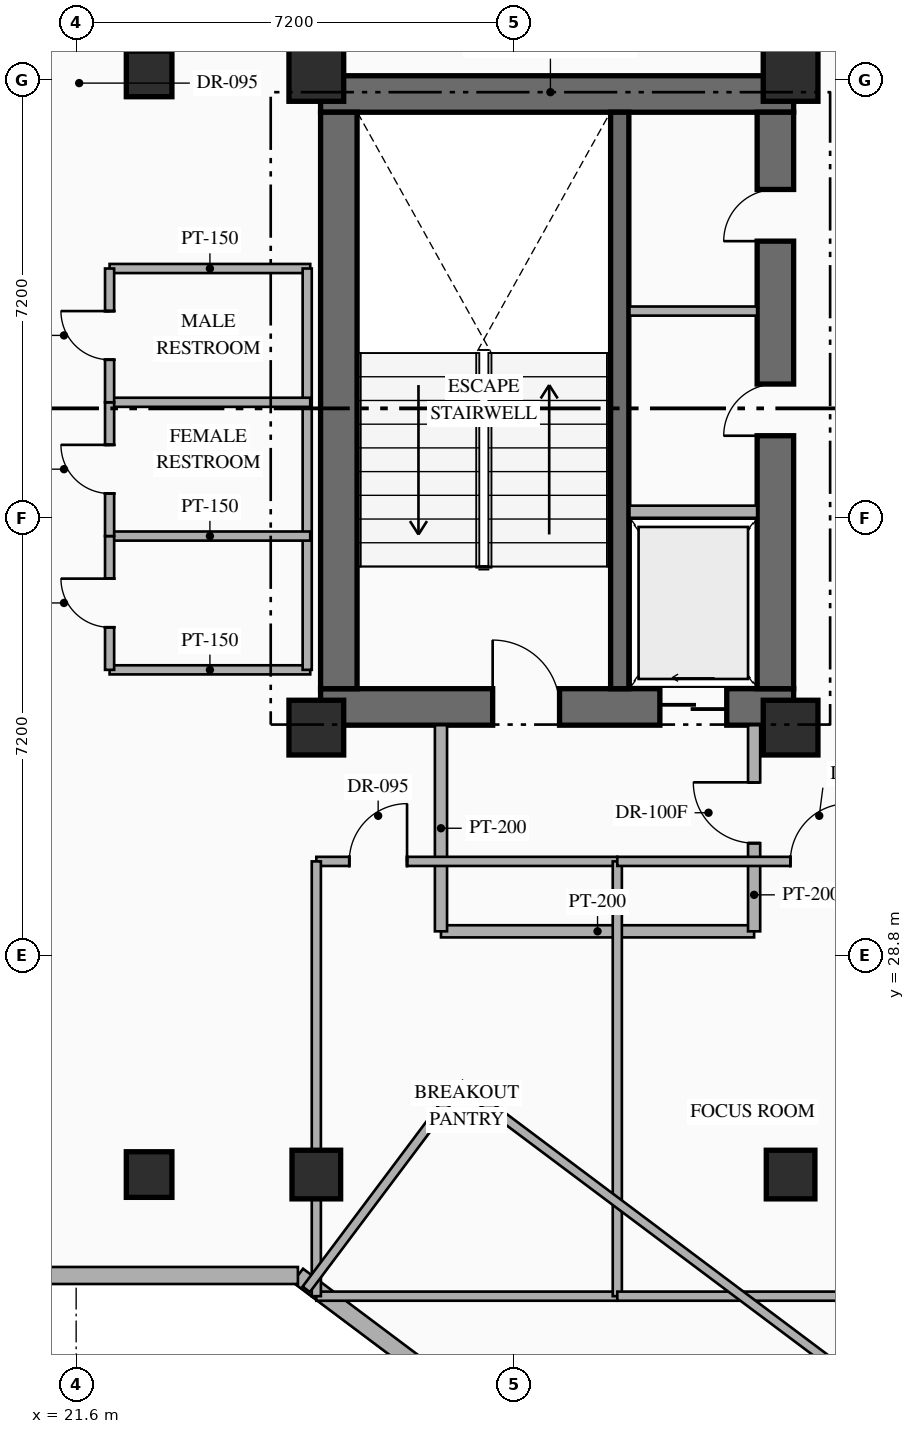
"""IFC4 building model, lengths in metres.
Left out: names, types, materials, properties, quantities, classifications, styles, units other than length and angle.
Written with IfcOpenShell. Run it as: python <this file> out.ifc"""

import sys

from ifc_helpers import new_model, si_unit, direction, frame, frame_2d, origin, origin_2d, place, context, subcontext, project, spatial, rectangle, hollow_rectangle, extrude, element, fill, save


model = new_model("IFC4")
c1 = context("Model", 3, precision=1e-05, world=origin(), true_north=direction((0.0, 1.0)))
c2 = subcontext(c1, "Body", "Model", "MODEL_VIEW")
j1 = project(units=[si_unit("LENGTHUNIT", "METRE"), si_unit("PLANEANGLEUNIT", "RADIAN")], contexts=[c1])
p1 = place(None, origin())
s1 = spatial("IfcSite", under=j1, at=p1, CompositionType="ELEMENT")
p2 = place(p1, origin())
s2 = spatial("IfcBuilding", under=s1, at=p2, CompositionType="ELEMENT")
p3 = place(p2, frame((0.0, 0.0, 167.25)))
s3 = spatial("IfcBuildingStorey", under=s2, at=p3, CompositionType="ELEMENT", Elevation=167.25)
p4 = place(p3, frame((25.62, 32.89, 0.0), z_axis=(0.0, 0.0, 1.0), x_axis=(1.0, 0.0, 0.0)))
e1 = element("IfcWall", 1, at=p4, inside=s3, PredefinedType="SHEAR", context=c2, shape_type="SweptSolid", body=[
    extrude(rectangle(XDim=7.78, YDim=0.6, at=frame_2d((3.89, 0.0))), origin(), (0.0, 0.0, 1.0), 3.6),
])
p5 = place(p4, frame((2.83, 0.0, 0.0)))
e2 = element("IfcOpeningElement", 2, at=p5, cuts=e1, PredefinedType="OPENING", context=c2, shape_type="SweptSolid", body=[
    extrude(rectangle(XDim=1.1, YDim=2.2, at=frame_2d((0.55, 1.1))), frame((0.0, 0.31, 0.0), z_axis=(0.0, -1.0, 0.0), x_axis=(1.0, 0.0, 0.0)), (0.0, 0.0, 1.0), 0.62),
])
p6 = place(p4, frame((5.58, 0.0, 0.0)))
e3 = element("IfcOpeningElement", 3, at=p6, cuts=e1, PredefinedType="OPENING", context=c2, shape_type="SweptSolid", body=[
    extrude(rectangle(XDim=1.1, YDim=2.15, at=frame_2d((0.55, 1.075))), frame((0.0, 0.31, 0.0), z_axis=(0.0, -1.0, 0.0), x_axis=(1.0, 0.0, 0.0)), (0.0, 0.0, 1.0), 0.62),
])
p7 = place(p3, frame((25.62, 42.97, 0.0), z_axis=(0.0, 0.0, 1.0), x_axis=(1.0, 0.0, 0.0)))
e4 = element("IfcWall", 4, at=p7, inside=s3, PredefinedType="SHEAR", context=c2, shape_type="SweptSolid", body=[
    extrude(rectangle(XDim=7.78, YDim=0.6, at=frame_2d((3.89, 0.0))), origin(), (0.0, 0.0, 1.0), 3.6),
])
p8 = place(p3, frame((25.92, 33.19, 0.0), z_axis=(0.0, 0.0, 1.0), x_axis=(0.0, 1.0, 0.0)))
e5 = element("IfcWall", 5, at=p8, inside=s3, PredefinedType="SHEAR", context=c2, shape_type="SweptSolid", body=[
    extrude(rectangle(XDim=9.48, YDim=0.6, at=frame_2d((4.74, 0.0))), origin(), (0.0, 0.0, 1.0), 3.6),
])
p9 = place(p3, frame((33.1, 33.19, 0.0), z_axis=(0.0, 0.0, 1.0), x_axis=(0.0, 1.0, 0.0)))
e6 = element("IfcWall", 6, at=p9, inside=s3, PredefinedType="SHEAR", context=c2, shape_type="SweptSolid", body=[
    extrude(rectangle(XDim=9.48, YDim=0.6, at=frame_2d((4.74, 0.0))), origin(), (0.0, 0.0, 1.0), 3.6),
])
p10 = place(p9, frame((4.16, 0.0, 0.0)))
e7 = element("IfcOpeningElement", 7, at=p10, cuts=e6, PredefinedType="OPENING", context=c2, shape_type="SweptSolid", body=[
    extrude(rectangle(XDim=0.85, YDim=2.08, at=frame_2d((0.425, 1.04))), frame((0.0, 0.31, 0.0), z_axis=(0.0, -1.0, 0.0), x_axis=(1.0, 0.0, 0.0)), (0.0, 0.0, 1.0), 0.62),
])
p11 = place(p9, frame((7.36, 0.0, 0.0)))
e8 = element("IfcOpeningElement", 8, at=p11, cuts=e6, PredefinedType="OPENING", context=c2, shape_type="SweptSolid", body=[
    extrude(rectangle(XDim=0.85, YDim=2.08, at=frame_2d((0.425, 1.04))), frame((0.0, 0.31, 0.0), z_axis=(0.0, -1.0, 0.0), x_axis=(1.0, 0.0, 0.0)), (0.0, 0.0, 1.0), 0.62),
])
p12 = place(p3, frame((30.54, 33.19, 0.0), z_axis=(0.0, 0.0, 1.0), x_axis=(0.0, 1.0, 0.0)))
e9 = element("IfcWall", 9, at=p12, inside=s3, PredefinedType="SHEAR", context=c2, shape_type="SweptSolid", body=[
    extrude(rectangle(XDim=9.48, YDim=0.3, at=frame_2d((4.74, 0.0))), origin(), (0.0, 0.0, 1.0), 3.6),
])
for number, where, z_axis, x_axis in (
    (10, (25.55, 32.55, 0.0), (0.0, 0.0, 1.0), (1.0, 0.0, 0.0)),
    (11, (33.35, 32.55, 0.0), (0.0, 0.0, 1.0), (1.0, 0.0, 0.0)),
    (12, (25.55, 43.3, 0.0), (0.0, 0.0, 1.0), (1.0, 0.0, 0.0)),
    (13, (33.35, 43.3, 0.0), (0.0, 0.0, 1.0), (1.0, 0.0, 0.0)),
):
    element("IfcColumn", number, at=place(p3, frame(where, z_axis=z_axis, x_axis=x_axis)), inside=s3, PredefinedType="COLUMN", context=c2, shape_type="SweptSolid", body=[
        extrude(rectangle(XDim=0.9, YDim=0.9, at=origin_2d()), origin(), (0.0, 0.0, 1.0), 3.6),
    ])
for number, where, z_axis, x_axis in (
    (14, (25.55, 25.2, 0.0), (0.0, 0.0, 1.0), (1.0, 0.0, 0.0)),
    (15, (33.35, 25.2, 0.0), (0.0, 0.0, 1.0), (1.0, 0.0, 0.0)),
):
    element("IfcColumn", number, at=place(p3, frame(where, z_axis=z_axis, x_axis=x_axis)), inside=s3, PredefinedType="COLUMN", context=c2, shape_type="SweptSolid", body=[
        extrude(hollow_rectangle(XDim=0.8, YDim=0.8, WallThickness=0.032, at=origin_2d()), origin(), (0.0, 0.0, 1.0), 3.6),
    ])
for number, where, z_axis, x_axis in (
    (16, (22.8, 25.2, 0.0), (0.0, 0.0, 1.0), (1.0, 0.0, 0.0)),
    (17, (22.8, 43.3, 0.0), (0.0, 0.0, 1.0), (1.0, 0.0, 0.0)),
):
    element("IfcColumn", number, at=place(p3, frame(where, z_axis=z_axis, x_axis=x_axis)), inside=s3, PredefinedType="COLUMN", context=c2, shape_type="SweptSolid", body=[
        extrude(hollow_rectangle(XDim=0.75, YDim=0.75, WallThickness=0.028, at=origin_2d()), origin(), (0.0, 0.0, 1.0), 3.6),
    ])
p13 = place(p3, frame((44.918, 8.787, 0.0), z_axis=(0.0, 0.0, 1.0), x_axis=(-0.800004765927, 0.599993645378, 0.0)))
e18 = element("IfcWall", 18, at=p13, inside=s3, PredefinedType="STANDARD", context=c2, shape_type="SweptSolid", body=[
    extrude(rectangle(XDim=24.588, YDim=0.28, at=frame_2d((12.294, 0.0))), origin(), (0.0, 0.0, 1.0), 3.35),
])
p14 = place(p3, frame((25.247, 23.54, 0.0), z_axis=(0.0, 0.0, 1.0), x_axis=(-1.0, 0.0, 0.0)))
e19 = element("IfcWall", 19, at=p14, inside=s3, PredefinedType="STANDARD", context=c2, shape_type="SweptSolid", body=[
    extrude(rectangle(XDim=6.747, YDim=0.28, at=frame_2d((3.374, 0.0))), origin(), (0.0, 0.0, 1.0), 3.35),
])
p15 = place(p3, frame((30.7, 36.1, 0.0), z_axis=(0.0, 0.0, 1.0), x_axis=(1.0, 0.0, 0.0)))
e20 = element("IfcWall", 20, at=p15, inside=s3, PredefinedType="STANDARD", context=c2, shape_type="SweptSolid", body=[
    extrude(rectangle(XDim=2.1, YDim=0.2, at=frame_2d((1.05, 0.0))), origin(), (0.0, 0.0, 1.0), 3.35),
])
p16 = place(p3, frame((30.7, 39.4, 0.0), z_axis=(0.0, 0.0, 1.0), x_axis=(1.0, 0.0, 0.0)))
e21 = element("IfcWall", 21, at=p16, inside=s3, PredefinedType="PARTITIONING", context=c2, shape_type="SweptSolid", body=[
    extrude(rectangle(XDim=2.1, YDim=0.15, at=frame_2d((1.05, 0.0))), origin(), (0.0, 0.0, 1.0), 3.35),
])
p17 = place(p3, frame((27.6, 29.2, 0.0), z_axis=(0.0, 0.0, 1.0), x_axis=(1.0, 0.0, 0.0)))
e22 = element("IfcWall", 22, at=p17, inside=s3, PredefinedType="STANDARD", context=c2, shape_type="SweptSolid", body=[
    extrude(rectangle(XDim=5.15, YDim=0.2, at=frame_2d((2.575, 0.0))), origin(), (0.0, 0.0, 1.0), 3.35),
])
p18 = place(p3, frame((27.6, 29.2, 0.0), z_axis=(0.0, 0.0, 1.0), x_axis=(0.0, 1.0, 0.0)))
e23 = element("IfcWall", 23, at=p18, inside=s3, PredefinedType="STANDARD", context=c2, shape_type="SweptSolid", body=[
    extrude(rectangle(XDim=3.39, YDim=0.2, at=frame_2d((1.695, 0.0))), origin(), (0.0, 0.0, 1.0), 3.35),
])
p19 = place(p3, frame((32.75, 29.2, 0.0), z_axis=(0.0, 0.0, 1.0), x_axis=(0.0, 1.0, 0.0)))
e24 = element("IfcWall", 24, at=p19, inside=s3, PredefinedType="STANDARD", context=c2, shape_type="SweptSolid", body=[
    extrude(rectangle(XDim=3.39, YDim=0.2, at=frame_2d((1.695, 0.0))), origin(), (0.0, 0.0, 1.0), 3.35),
])
p20 = place(p19, frame((1.45, 0.0, 0.0)))
e25 = element("IfcOpeningElement", 25, at=p20, cuts=e24, PredefinedType="OPENING", context=c2, shape_type="SweptSolid", body=[
    extrude(rectangle(XDim=1.0, YDim=2.2, at=frame_2d((0.5, 1.1))), frame((0.0, 0.11, 0.0), z_axis=(0.0, -1.0, 0.0), x_axis=(1.0, 0.0, 0.0)), (0.0, 0.0, 1.0), 0.22),
])
for number, where, z_axis, x_axis in (
    (26, (22.15, 33.5, 0.0), (0.0, 0.0, 1.0), (1.0, 0.0, 0.0)),
    (27, (22.15, 40.1, 0.0), (0.0, 0.0, 1.0), (1.0, 0.0, 0.0)),
):
    element("IfcWall", number, at=place(p3, frame(where, z_axis=z_axis, x_axis=x_axis)), inside=s3, PredefinedType="PARTITIONING", context=c2, shape_type="SweptSolid", body=[
        extrude(rectangle(XDim=3.3, YDim=0.15, at=frame_2d((1.65, 0.0))), origin(), (0.0, 0.0, 1.0), 3.35),
    ])
p21 = place(p3, frame((25.4, 33.5, 0.0), z_axis=(0.0, 0.0, 1.0), x_axis=(0.0, 1.0, 0.0)))
e28 = element("IfcWall", 28, at=p21, inside=s3, PredefinedType="PARTITIONING", context=c2, shape_type="SweptSolid", body=[
    extrude(rectangle(XDim=6.6, YDim=0.15, at=frame_2d((3.3, 0.0))), origin(), (0.0, 0.0, 1.0), 3.35),
])
for number, where, z_axis, x_axis in (
    (29, (22.15, 35.7, 0.0), (0.0, 0.0, 1.0), (1.0, 0.0, 0.0)),
    (30, (22.15, 37.9, 0.0), (0.0, 0.0, 1.0), (1.0, 0.0, 0.0)),
):
    element("IfcWall", number, at=place(p3, frame(where, z_axis=z_axis, x_axis=x_axis)), inside=s3, PredefinedType="PARTITIONING", context=c2, shape_type="SweptSolid", body=[
        extrude(rectangle(XDim=3.3, YDim=0.15, at=frame_2d((1.65, 0.0))), origin(), (0.0, 0.0, 1.0), 3.35),
    ])
p22 = place(p3, frame((22.15, 33.5, 0.0), z_axis=(0.0, 0.0, 1.0), x_axis=(0.0, 1.0, 0.0)))
e31 = element("IfcWall", 31, at=p22, inside=s3, PredefinedType="PARTITIONING", context=c2, shape_type="SweptSolid", body=[
    extrude(rectangle(XDim=2.2, YDim=0.15, at=frame_2d((1.1, 0.0))), origin(), (0.0, 0.0, 1.0), 3.35),
])
p23 = place(p22, frame((0.7, 0.0, 0.0)))
e32 = element("IfcOpeningElement", 32, at=p23, cuts=e31, PredefinedType="OPENING", context=c2, shape_type="SweptSolid", body=[
    extrude(rectangle(XDim=0.8, YDim=2.06, at=frame_2d((0.4, 1.03))), frame((0.0, 0.085, 0.0), z_axis=(0.0, -1.0, 0.0), x_axis=(1.0, 0.0, 0.0)), (0.0, 0.0, 1.0), 0.17),
])
p24 = place(p3, frame((22.15, 35.7, 0.0), z_axis=(0.0, 0.0, 1.0), x_axis=(0.0, 1.0, 0.0)))
e33 = element("IfcWall", 33, at=p24, inside=s3, PredefinedType="PARTITIONING", context=c2, shape_type="SweptSolid", body=[
    extrude(rectangle(XDim=2.2, YDim=0.15, at=frame_2d((1.1, 0.0))), origin(), (0.0, 0.0, 1.0), 3.35),
])
p25 = place(p24, frame((0.7, 0.0, 0.0)))
e34 = element("IfcOpeningElement", 34, at=p25, cuts=e33, PredefinedType="OPENING", context=c2, shape_type="SweptSolid", body=[
    extrude(rectangle(XDim=0.8, YDim=2.06, at=frame_2d((0.4, 1.03))), frame((0.0, 0.085, 0.0), z_axis=(0.0, -1.0, 0.0), x_axis=(1.0, 0.0, 0.0)), (0.0, 0.0, 1.0), 0.17),
])
p26 = place(p3, frame((22.15, 37.9, 0.0), z_axis=(0.0, 0.0, 1.0), x_axis=(0.0, 1.0, 0.0)))
e35 = element("IfcWall", 35, at=p26, inside=s3, PredefinedType="PARTITIONING", context=c2, shape_type="SweptSolid", body=[
    extrude(rectangle(XDim=2.2, YDim=0.15, at=frame_2d((1.1, 0.0))), origin(), (0.0, 0.0, 1.0), 3.35),
])
p27 = place(p26, frame((0.7, 0.0, 0.0)))
e36 = element("IfcOpeningElement", 36, at=p27, cuts=e35, PredefinedType="OPENING", context=c2, shape_type="SweptSolid", body=[
    extrude(rectangle(XDim=0.8, YDim=2.06, at=frame_2d((0.4, 1.03))), frame((0.0, 0.085, 0.0), z_axis=(0.0, -1.0, 0.0), x_axis=(1.0, 0.0, 0.0)), (0.0, 0.0, 1.0), 0.17),
])
p28 = place(p3, frame((25.55, 23.2, 0.0), z_axis=(0.0, 0.0, 1.0), x_axis=(1.0, 0.0, 0.0)))
e37 = element("IfcWall", 37, at=p28, inside=s3, PredefinedType="PARTITIONING", context=c2, shape_type="SweptSolid", body=[
    extrude(rectangle(XDim=4.95, YDim=0.15, at=frame_2d((2.475, 0.0))), origin(), (0.0, 0.0, 1.0), 3.35),
])
p29 = place(p3, frame((25.55, 30.35, 0.0), z_axis=(0.0, 0.0, 1.0), x_axis=(1.0, 0.0, 0.0)))
e38 = element("IfcWall", 38, at=p29, inside=s3, PredefinedType="PARTITIONING", context=c2, shape_type="SweptSolid", body=[
    extrude(rectangle(XDim=4.95, YDim=0.15, at=frame_2d((2.475, 0.0))), origin(), (0.0, 0.0, 1.0), 3.35),
])
p30 = place(p29, frame((0.542, 0.0, 0.0)))
e39 = element("IfcOpeningElement", 39, at=p30, cuts=e38, PredefinedType="OPENING", context=c2, shape_type="SweptSolid", body=[
    extrude(rectangle(XDim=0.95, YDim=2.15, at=frame_2d((0.475, 1.075))), frame((0.0, 0.085, 0.0), z_axis=(0.0, -1.0, 0.0), x_axis=(1.0, 0.0, 0.0)), (0.0, 0.0, 1.0), 0.17),
])
p31 = place(p3, frame((25.55, 23.2, 0.0), z_axis=(0.0, 0.0, 1.0), x_axis=(0.0, 1.0, 0.0)))
e40 = element("IfcWall", 40, at=p31, inside=s3, PredefinedType="PARTITIONING", context=c2, shape_type="SweptSolid", body=[
    extrude(rectangle(XDim=7.15, YDim=0.15, at=frame_2d((3.575, 0.0))), origin(), (0.0, 0.0, 1.0), 2.695),
])
p32 = place(p3, frame((30.5, 23.2, 0.0), z_axis=(0.0, 0.0, 1.0), x_axis=(0.0, 1.0, 0.0)))
e41 = element("IfcWall", 41, at=p32, inside=s3, PredefinedType="PARTITIONING", context=c2, shape_type="SweptSolid", body=[
    extrude(rectangle(XDim=7.15, YDim=0.15, at=frame_2d((3.575, 0.0))), origin(), (0.0, 0.0, 1.0), 3.35),
])
p33 = place(p3, frame((30.5, 23.2, 0.0), z_axis=(0.0, 0.0, 1.0), x_axis=(1.0, 0.0, 0.0)))
e42 = element("IfcWall", 42, at=p33, inside=s3, PredefinedType="PARTITIONING", context=c2, shape_type="SweptSolid", body=[
    extrude(rectangle(XDim=4.45, YDim=0.15, at=frame_2d((2.225, 0.0))), origin(), (0.0, 0.0, 1.0), 3.35),
])
p34 = place(p3, frame((30.5, 30.35, 0.0), z_axis=(0.0, 0.0, 1.0), x_axis=(1.0, 0.0, 0.0)))
e43 = element("IfcWall", 43, at=p34, inside=s3, PredefinedType="PARTITIONING", context=c2, shape_type="SweptSolid", body=[
    extrude(rectangle(XDim=4.45, YDim=0.15, at=frame_2d((2.225, 0.0))), origin(), (0.0, 0.0, 1.0), 3.35),
])
p35 = place(p34, frame((2.846, 0.0, 0.0)))
e44 = element("IfcOpeningElement", 44, at=p35, cuts=e43, PredefinedType="OPENING", context=c2, shape_type="SweptSolid", body=[
    extrude(rectangle(XDim=0.95, YDim=2.15, at=frame_2d((0.475, 1.075))), frame((0.0, 0.085, 0.0), z_axis=(0.0, -1.0, 0.0), x_axis=(1.0, 0.0, 0.0)), (0.0, 0.0, 1.0), 0.17),
])
p36 = place(p3, frame((27.91, 26.68, 0.0), z_axis=(0.0, 0.0, 1.0), x_axis=(0.800005938517, -0.599992081896, 0.0)))
e45 = element("IfcWall", 45, at=p36, inside=s3, PredefinedType="PARTITIONING", context=c2, shape_type="SweptSolid", body=[
    extrude(rectangle(XDim=14.8, YDim=0.15, at=frame_2d((7.4, 0.0))), origin(), (0.0, 0.0, 1.0), 3.35),
])
p37 = place(p36, frame((9.281, 0.0, 0.0)))
e46 = element("IfcOpeningElement", 46, at=p37, cuts=e45, PredefinedType="OPENING", context=c2, shape_type="SweptSolid", body=[
    extrude(rectangle(XDim=0.95, YDim=2.15, at=frame_2d((0.475, 1.075))), frame((0.0, 0.085, 0.0), z_axis=(0.0, -1.0, 0.0), x_axis=(1.0, 0.0, 0.0)), (0.0, 0.0, 1.0), 0.17),
])
p38 = place(p3, frame((25.384, 23.312, 0.0), z_axis=(0.0, 0.0, 1.0), x_axis=(0.599990721155, 0.80000695905, 0.0)))
e47 = element("IfcWall", 47, at=p38, inside=s3, PredefinedType="PARTITIONING", context=c2, shape_type="SweptSolid", body=[
    extrude(rectangle(XDim=4.21, YDim=0.15, at=frame_2d((2.105, 0.0))), origin(), (0.0, 0.0, 1.0), 3.35),
])
p39 = place(p5, origin())
e48 = element("IfcDoor", 48, at=p39, inside=s3, OperationType="SINGLE_SWING_LEFT", PredefinedType="DOOR", context=c2, shape_type="SweptSolid", body=[
    extrude(rectangle(XDim=1.1, YDim=2.2, at=frame_2d((0.55, 1.1))), frame((0.0, 0.025, 0.0), z_axis=(0.0, -1.0, 0.0), x_axis=(1.0, 0.0, 0.0)), (0.0, 0.0, 1.0), 0.05),
])
fill(e2, e48)
p40 = place(p6, origin())
e49 = element("IfcDoor", 49, at=p40, inside=s3, OperationType="SLIDING_TO_LEFT", PredefinedType="USERDEFINED", context=c2, shape_type="SweptSolid", body=[
    extrude(rectangle(XDim=1.1, YDim=2.15, at=frame_2d((0.55, 1.075))), frame((0.0, 0.025, 0.0), z_axis=(0.0, -1.0, 0.0), x_axis=(1.0, 0.0, 0.0)), (0.0, 0.0, 1.0), 0.05),
])
fill(e3, e49)
p41 = place(p10, origin())
e50 = element("IfcDoor", 50, at=p41, inside=s3, OperationType="SINGLE_SWING_LEFT", PredefinedType="DOOR", context=c2, shape_type="SweptSolid", body=[
    extrude(rectangle(XDim=0.85, YDim=2.08, at=frame_2d((0.425, 1.04))), frame((0.0, 0.025, 0.0), z_axis=(0.0, -1.0, 0.0), x_axis=(1.0, 0.0, 0.0)), (0.0, 0.0, 1.0), 0.05),
])
fill(e7, e50)
p42 = place(p11, origin())
e51 = element("IfcDoor", 51, at=p42, inside=s3, OperationType="SINGLE_SWING_LEFT", PredefinedType="DOOR", context=c2, shape_type="SweptSolid", body=[
    extrude(rectangle(XDim=0.85, YDim=2.08, at=frame_2d((0.425, 1.04))), frame((0.0, 0.025, 0.0), z_axis=(0.0, -1.0, 0.0), x_axis=(1.0, 0.0, 0.0)), (0.0, 0.0, 1.0), 0.05),
])
fill(e8, e51)
p43 = place(p20, origin())
e52 = element("IfcDoor", 52, at=p43, inside=s3, OperationType="SINGLE_SWING_RIGHT", PredefinedType="DOOR", context=c2, shape_type="SweptSolid", body=[
    extrude(rectangle(XDim=1.0, YDim=2.2, at=frame_2d((0.5, 1.1))), frame((0.0, 0.025, 0.0), z_axis=(0.0, -1.0, 0.0), x_axis=(1.0, 0.0, 0.0)), (0.0, 0.0, 1.0), 0.05),
])
fill(e25, e52)
p44 = place(p23, origin())
e53 = element("IfcDoor", 53, at=p44, inside=s3, OperationType="SINGLE_SWING_RIGHT", PredefinedType="DOOR", context=c2, shape_type="SweptSolid", body=[
    extrude(rectangle(XDim=0.8, YDim=2.06, at=frame_2d((0.4, 1.03))), frame((0.0, 0.025, 0.0), z_axis=(0.0, -1.0, 0.0), x_axis=(1.0, 0.0, 0.0)), (0.0, 0.0, 1.0), 0.05),
])
fill(e32, e53)
p45 = place(p25, origin())
e54 = element("IfcDoor", 54, at=p45, inside=s3, OperationType="SINGLE_SWING_RIGHT", PredefinedType="DOOR", context=c2, shape_type="SweptSolid", body=[
    extrude(rectangle(XDim=0.8, YDim=2.06, at=frame_2d((0.4, 1.03))), frame((0.0, 0.025, 0.0), z_axis=(0.0, -1.0, 0.0), x_axis=(1.0, 0.0, 0.0)), (0.0, 0.0, 1.0), 0.05),
])
fill(e34, e54)
p46 = place(p27, origin())
e55 = element("IfcDoor", 55, at=p46, inside=s3, OperationType="SINGLE_SWING_RIGHT", PredefinedType="DOOR", context=c2, shape_type="SweptSolid", body=[
    extrude(rectangle(XDim=0.8, YDim=2.06, at=frame_2d((0.4, 1.03))), frame((0.0, 0.025, 0.0), z_axis=(0.0, -1.0, 0.0), x_axis=(1.0, 0.0, 0.0)), (0.0, 0.0, 1.0), 0.05),
])
fill(e36, e55)
p47 = place(p30, origin())
e56 = element("IfcDoor", 56, at=p47, inside=s3, OperationType="SINGLE_SWING_RIGHT", PredefinedType="DOOR", context=c2, shape_type="SweptSolid", body=[
    extrude(rectangle(XDim=0.95, YDim=2.15, at=frame_2d((0.475, 1.075))), frame((0.0, 0.025, 0.0), z_axis=(0.0, -1.0, 0.0), x_axis=(1.0, 0.0, 0.0)), (0.0, 0.0, 1.0), 0.05),
])
fill(e39, e56)
p48 = place(p35, origin())
e57 = element("IfcDoor", 57, at=p48, inside=s3, OperationType="SINGLE_SWING_RIGHT", PredefinedType="DOOR", context=c2, shape_type="SweptSolid", body=[
    extrude(rectangle(XDim=0.95, YDim=2.15, at=frame_2d((0.475, 1.075))), frame((0.0, 0.025, 0.0), z_axis=(0.0, -1.0, 0.0), x_axis=(1.0, 0.0, 0.0)), (0.0, 0.0, 1.0), 0.05),
])
fill(e44, e57)
save(model, sys.argv[1])
